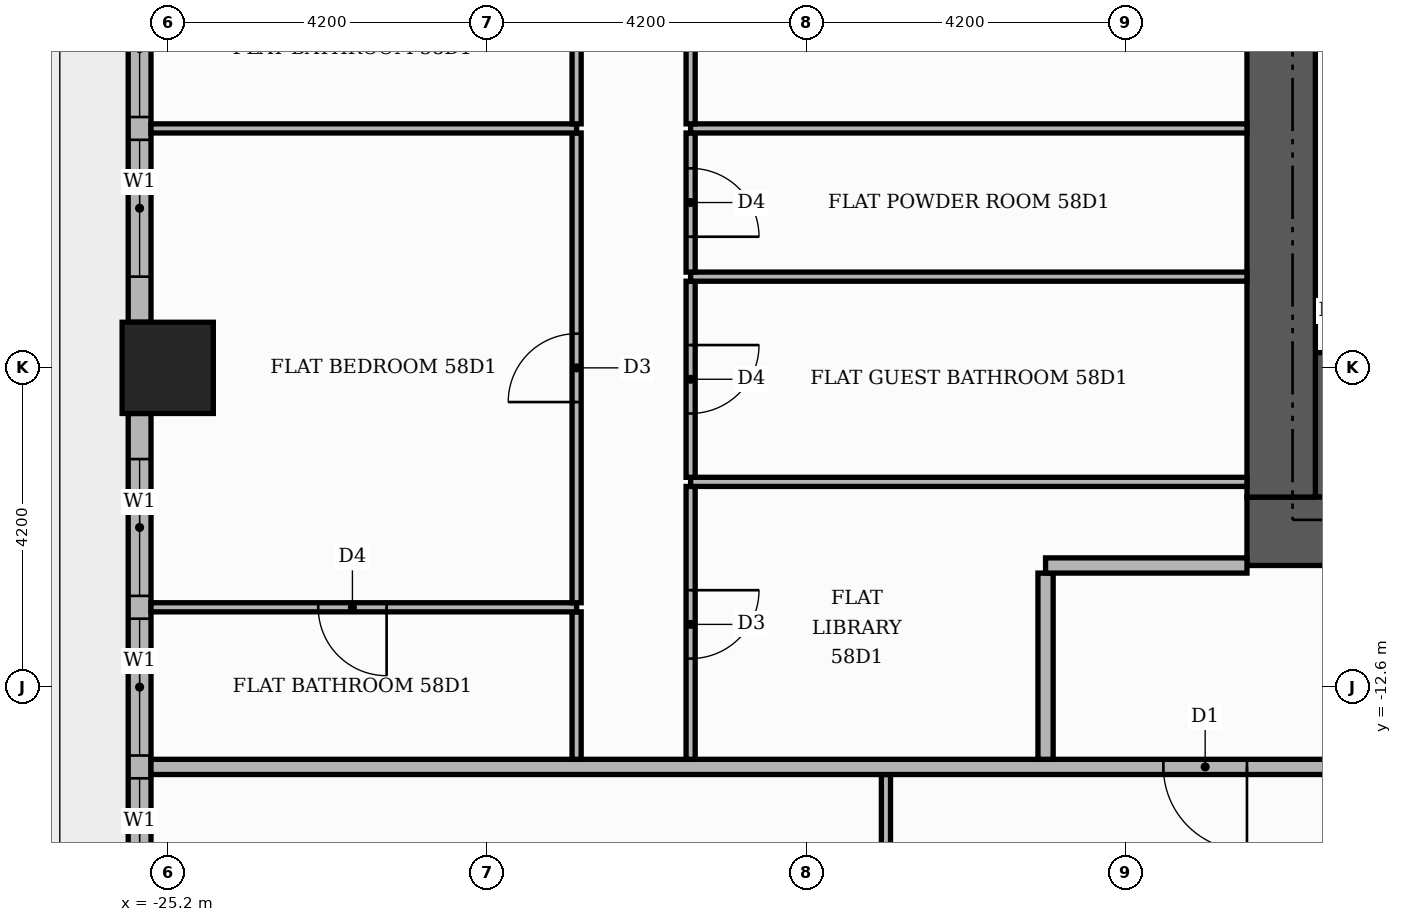
"""IFC4 building model, lengths in metres.
Left out: names, types, materials, properties, quantities, classifications, styles, units other than length and angle.
Written with IfcOpenShell. Run it as: python <this file> out.ifc"""

import sys

from ifc_helpers import new_model, si_unit, direction, frame, frame_2d, origin, origin_2d, place, context, subcontext, project, spatial, rectangle, extrude, element, fill, save


model = new_model("IFC4")
c1 = context("Model", 3, precision=1e-05, world=origin(), true_north=direction((0.0, 1.0)))
c2 = subcontext(c1, "Body", "Model", "MODEL_VIEW")
j1 = project(units=[si_unit("LENGTHUNIT", "METRE"), si_unit("PLANEANGLEUNIT", "RADIAN")], contexts=[c1])
p1 = place(None, origin())
s1 = spatial("IfcSite", under=j1, at=p1, CompositionType="ELEMENT")
p2 = place(p1, origin())
s2 = spatial("IfcBuilding", under=s1, at=p2, CompositionType="ELEMENT")
p3 = place(p2, frame((0.0, 0.0, 244.5)))
s3 = spatial("IfcBuildingStorey", under=s2, at=p3, CompositionType="ELEMENT", Elevation=244.5)
p4 = place(p3, frame((-10.1, -9.15, 0.0), z_axis=(0.0, 0.0, 1.0), x_axis=(1.0, 0.0, 0.0)))
e1 = element("IfcWall", 1, at=p4, inside=s3, PredefinedType="SHEAR", context=c2, shape_type="SweptSolid", body=[
    extrude(rectangle(XDim=4.6, YDim=1.9, at=frame_2d((2.3, 0.0))), origin(), (0.0, 0.0, 1.0), 3.48),
])
p5 = place(p3, frame((-11.0, -10.55, 0.0), z_axis=(0.0, 0.0, 1.0), x_axis=(1.0, 0.0, 0.0)))
e2 = element("IfcWall", 2, at=p5, inside=s3, PredefinedType="SHEAR", context=c2, shape_type="SweptSolid", body=[
    extrude(rectangle(XDim=22.0, YDim=0.9, at=frame_2d((11.0, 0.0))), origin(), (0.0, 0.0, 1.0), 3.48),
])
p6 = place(p5, frame((7.4, 0.0, 0.0)))
e3 = element("IfcOpeningElement", 3, at=p6, cuts=e2, PredefinedType="OPENING", context=c2, shape_type="SweptSolid", body=[
    extrude(rectangle(XDim=1.8, YDim=2.2, at=frame_2d((0.9, 1.1))), frame((0.0, 0.46, 0.0), z_axis=(0.0, -1.0, 0.0), x_axis=(1.0, 0.0, 0.0)), (0.0, 0.0, 1.0), 0.92),
])
p7 = place(p3, frame((-10.55, -10.1, 0.0), z_axis=(0.0, 0.0, 1.0), x_axis=(0.0, 1.0, 0.0)))
e4 = element("IfcWall", 4, at=p7, inside=s3, PredefinedType="SHEAR", context=c2, shape_type="SweptSolid", body=[
    extrude(rectangle(XDim=20.2, YDim=0.9, at=frame_2d((10.1, 0.0))), origin(), (0.0, 0.0, 1.0), 3.48),
])
p8 = place(p3, frame((-25.2, -8.4, 0.0), z_axis=(0.0, 0.0, 1.0), x_axis=(1.0, 0.0, 0.0)))
e5 = element("IfcColumn", 5, at=p8, inside=s3, PredefinedType="COLUMN", context=c2, shape_type="SweptSolid", body=[
    extrude(rectangle(XDim=1.2, YDim=1.2, at=origin_2d()), origin(), (0.0, 0.0, 1.0), 3.9),
])
p9 = place(p3, frame((-25.57, -0.6, 0.0), z_axis=(0.0, 0.0, 1.0), x_axis=(0.0, -1.0, 0.0)))
e6 = element("IfcWall", 6, at=p9, inside=s3, PredefinedType="STANDARD", context=c2, shape_type="SweptSolid", body=[
    extrude(rectangle(XDim=7.2, YDim=0.3, at=frame_2d((3.6, 0.0))), origin(), (0.0, 0.0, 1.0), 3.48),
])
p10 = place(p9, frame((0.6, 0.0, 0.9)))
e7 = element("IfcOpeningElement", 7, at=p10, cuts=e6, PredefinedType="OPENING", context=c2, shape_type="SweptSolid", body=[
    extrude(rectangle(XDim=1.8, YDim=2.1, at=frame_2d((0.9, 1.05))), frame((0.0, 0.16, 0.0), z_axis=(0.0, -1.0, 0.0), x_axis=(1.0, 0.0, 0.0)), (0.0, 0.0, 1.0), 0.32),
])
p11 = place(p9, frame((2.7, 0.0, 0.9)))
e8 = element("IfcOpeningElement", 8, at=p11, cuts=e6, PredefinedType="OPENING", context=c2, shape_type="SweptSolid", body=[
    extrude(rectangle(XDim=1.8, YDim=2.1, at=frame_2d((0.9, 1.05))), frame((0.0, 0.16, 0.0), z_axis=(0.0, -1.0, 0.0), x_axis=(1.0, 0.0, 0.0)), (0.0, 0.0, 1.0), 0.32),
])
p12 = place(p9, frame((4.8, 0.0, 0.9)))
e9 = element("IfcOpeningElement", 9, at=p12, cuts=e6, PredefinedType="OPENING", context=c2, shape_type="SweptSolid", body=[
    extrude(rectangle(XDim=1.8, YDim=2.1, at=frame_2d((0.9, 1.05))), frame((0.0, 0.16, 0.0), z_axis=(0.0, -1.0, 0.0), x_axis=(1.0, 0.0, 0.0)), (0.0, 0.0, 1.0), 0.32),
])
p13 = place(p3, frame((-25.57, -9.0, 0.0), z_axis=(0.0, 0.0, 1.0), x_axis=(0.0, -1.0, 0.0)))
e10 = element("IfcWall", 10, at=p13, inside=s3, PredefinedType="STANDARD", context=c2, shape_type="SweptSolid", body=[
    extrude(rectangle(XDim=7.2, YDim=0.3, at=frame_2d((3.6, 0.0))), origin(), (0.0, 0.0, 1.0), 3.48),
])
p14 = place(p13, frame((0.6, 0.0, 0.9)))
e11 = element("IfcOpeningElement", 11, at=p14, cuts=e10, PredefinedType="OPENING", context=c2, shape_type="SweptSolid", body=[
    extrude(rectangle(XDim=1.8, YDim=2.1, at=frame_2d((0.9, 1.05))), frame((0.0, 0.16, 0.0), z_axis=(0.0, -1.0, 0.0), x_axis=(1.0, 0.0, 0.0)), (0.0, 0.0, 1.0), 0.32),
])
p15 = place(p13, frame((2.7, 0.0, 0.9)))
e12 = element("IfcOpeningElement", 12, at=p15, cuts=e10, PredefinedType="OPENING", context=c2, shape_type="SweptSolid", body=[
    extrude(rectangle(XDim=1.8, YDim=2.1, at=frame_2d((0.9, 1.05))), frame((0.0, 0.16, 0.0), z_axis=(0.0, -1.0, 0.0), x_axis=(1.0, 0.0, 0.0)), (0.0, 0.0, 1.0), 0.32),
])
p16 = place(p13, frame((4.8, 0.0, 0.9)))
e13 = element("IfcOpeningElement", 13, at=p16, cuts=e10, PredefinedType="OPENING", context=c2, shape_type="SweptSolid", body=[
    extrude(rectangle(XDim=1.8, YDim=2.1, at=frame_2d((0.9, 1.05))), frame((0.0, 0.16, 0.0), z_axis=(0.0, -1.0, 0.0), x_axis=(1.0, 0.0, 0.0)), (0.0, 0.0, 1.0), 0.32),
])
p17 = place(p3, frame((-15.75, -20.06, 0.0), z_axis=(0.0, 0.0, 1.0), x_axis=(0.0, 1.0, 0.0)))
e14 = element("IfcWall", 14, at=p17, inside=s3, PredefinedType="PARTITIONING", context=c2, shape_type="SweptSolid", body=[
    extrude(rectangle(XDim=6.31, YDim=0.12, at=frame_2d((3.155, 0.0))), origin(), (0.0, 0.0, 1.0), 3.48),
])
p18 = place(p17, frame((2.725, 0.0, 0.0)))
e15 = element("IfcOpeningElement", 15, at=p18, cuts=e14, PredefinedType="OPENING", context=c2, shape_type="SweptSolid", body=[
    extrude(rectangle(XDim=0.9, YDim=2.1, at=frame_2d((0.45, 1.05))), frame((0.0, 0.07, 0.0), z_axis=(0.0, -1.0, 0.0), x_axis=(1.0, 0.0, 0.0)), (0.0, 0.0, 1.0), 0.14),
])
p19 = place(p3, frame((-25.42, -13.65, 0.0), z_axis=(0.0, 0.0, 1.0), x_axis=(1.0, 0.0, 0.0)))
e16 = element("IfcWall", 16, at=p19, inside=s3, PredefinedType="PARTITIONING", context=c2, shape_type="SweptSolid", body=[
    extrude(rectangle(XDim=39.07, YDim=0.2, at=frame_2d((19.535, 0.0))), origin(), (0.0, 0.0, 1.0), 3.48),
])
p20 = place(p19, frame((13.32, 0.0, 0.0)))
e17 = element("IfcOpeningElement", 17, at=p20, cuts=e16, PredefinedType="OPENING", context=c2, shape_type="SweptSolid", body=[
    extrude(rectangle(XDim=1.1, YDim=2.4, at=frame_2d((0.55, 1.2))), frame((0.0, 0.11, 0.0), z_axis=(0.0, -1.0, 0.0), x_axis=(1.0, 0.0, 0.0)), (0.0, 0.0, 1.0), 0.22),
])
p21 = place(p3, frame((-19.82, -13.55, 0.0), z_axis=(0.0, 0.0, 1.0), x_axis=(0.0, 1.0, 0.0)))
e18 = element("IfcWall", 18, at=p21, inside=s3, PredefinedType="PARTITIONING", context=c2, shape_type="SweptSolid", body=[
    extrude(rectangle(XDim=1.94, YDim=0.12, at=frame_2d((0.97, 0.0))), origin(), (0.0, 0.0, 1.0), 3.48),
])
p22 = place(p3, frame((-18.32, -13.55, 0.0), z_axis=(0.0, 0.0, 1.0), x_axis=(0.0, 1.0, 0.0)))
e19 = element("IfcWall", 19, at=p22, inside=s3, PredefinedType="PARTITIONING", context=c2, shape_type="SweptSolid", body=[
    extrude(rectangle(XDim=3.59, YDim=0.12, at=frame_2d((1.795, 0.0))), origin(), (0.0, 0.0, 1.0), 3.48),
])
p23 = place(p22, frame((1.325, 0.0, 0.0)))
e20 = element("IfcOpeningElement", 20, at=p23, cuts=e19, PredefinedType="OPENING", context=c2, shape_type="SweptSolid", body=[
    extrude(rectangle(XDim=0.9, YDim=2.1, at=frame_2d((0.45, 1.05))), frame((0.0, 0.07, 0.0), z_axis=(0.0, -1.0, 0.0), x_axis=(1.0, 0.0, 0.0)), (0.0, 0.0, 1.0), 0.14),
])
p24 = place(p3, frame((-13.65, -13.55, 0.0), z_axis=(0.0, 0.0, 1.0), x_axis=(0.0, 1.0, 0.0)))
e21 = element("IfcWall", 21, at=p24, inside=s3, PredefinedType="PARTITIONING", context=c2, shape_type="SweptSolid", body=[
    extrude(rectangle(XDim=2.45, YDim=0.2, at=frame_2d((1.225, 0.0))), origin(), (0.0, 0.0, 1.0), 3.48),
])
p25 = place(p3, frame((-25.42, -11.55, 0.0), z_axis=(0.0, 0.0, 1.0), x_axis=(1.0, 0.0, 0.0)))
e22 = element("IfcWall", 22, at=p25, inside=s3, PredefinedType="PARTITIONING", context=c2, shape_type="SweptSolid", body=[
    extrude(rectangle(XDim=5.6, YDim=0.12, at=frame_2d((2.8, 0.0))), origin(), (0.0, 0.0, 1.0), 3.48),
])
p26 = place(p25, frame((2.2, 0.0, 0.0)))
e23 = element("IfcOpeningElement", 23, at=p26, cuts=e22, PredefinedType="OPENING", context=c2, shape_type="SweptSolid", body=[
    extrude(rectangle(XDim=0.9, YDim=2.1, at=frame_2d((0.45, 1.05))), frame((0.0, 0.07, 0.0), z_axis=(0.0, -1.0, 0.0), x_axis=(1.0, 0.0, 0.0)), (0.0, 0.0, 1.0), 0.14),
])
p27 = place(p3, frame((-19.82, -11.49, 0.0), z_axis=(0.0, 0.0, 1.0), x_axis=(0.0, 1.0, 0.0)))
e24 = element("IfcWall", 24, at=p27, inside=s3, PredefinedType="PARTITIONING", context=c2, shape_type="SweptSolid", body=[
    extrude(rectangle(XDim=6.18, YDim=0.12, at=frame_2d((3.09, 0.0))), origin(), (0.0, 0.0, 1.0), 3.48),
])
p28 = place(p27, frame((2.64, 0.0, 0.0)))
e25 = element("IfcOpeningElement", 25, at=p28, cuts=e24, PredefinedType="OPENING", context=c2, shape_type="SweptSolid", body=[
    extrude(rectangle(XDim=0.9, YDim=2.1, at=frame_2d((0.45, 1.05))), frame((0.0, 0.07, 0.0), z_axis=(0.0, -1.0, 0.0), x_axis=(1.0, 0.0, 0.0)), (0.0, 0.0, 1.0), 0.14),
])
p29 = place(p3, frame((-13.65, -11.0, 0.0), z_axis=(0.0, 0.0, 1.0), x_axis=(1.0, 0.0, 0.0)))
e26 = element("IfcWall", 26, at=p29, inside=s3, PredefinedType="PARTITIONING", context=c2, shape_type="SweptSolid", body=[
    extrude(rectangle(XDim=2.65, YDim=0.2, at=frame_2d((1.325, 0.0))), origin(), (0.0, 0.0, 1.0), 3.48),
])
p30 = place(p3, frame((-18.32, -9.9, 0.0), z_axis=(0.0, 0.0, 1.0), x_axis=(1.0, 0.0, 0.0)))
e27 = element("IfcWall", 27, at=p30, inside=s3, PredefinedType="PARTITIONING", context=c2, shape_type="SweptSolid", body=[
    extrude(rectangle(XDim=7.32, YDim=0.12, at=frame_2d((3.66, 0.0))), origin(), (0.0, 0.0, 1.0), 3.48),
])
p31 = place(p3, frame((-18.32, -9.84, 0.0), z_axis=(0.0, 0.0, 1.0), x_axis=(0.0, 1.0, 0.0)))
e28 = element("IfcWall", 28, at=p31, inside=s3, PredefinedType="PARTITIONING", context=c2, shape_type="SweptSolid", body=[
    extrude(rectangle(XDim=2.58, YDim=0.12, at=frame_2d((1.29, 0.0))), origin(), (0.0, 0.0, 1.0), 3.48),
])
p32 = place(p31, frame((0.84, 0.0, 0.0)))
e29 = element("IfcOpeningElement", 29, at=p32, cuts=e28, PredefinedType="OPENING", context=c2, shape_type="SweptSolid", body=[
    extrude(rectangle(XDim=0.9, YDim=2.1, at=frame_2d((0.45, 1.05))), frame((0.0, 0.07, 0.0), z_axis=(0.0, -1.0, 0.0), x_axis=(1.0, 0.0, 0.0)), (0.0, 0.0, 1.0), 0.14),
])
p33 = place(p3, frame((-18.32, -7.2, 0.0), z_axis=(0.0, 0.0, 1.0), x_axis=(1.0, 0.0, 0.0)))
e30 = element("IfcWall", 30, at=p33, inside=s3, PredefinedType="PARTITIONING", context=c2, shape_type="SweptSolid", body=[
    extrude(rectangle(XDim=7.32, YDim=0.12, at=frame_2d((3.66, 0.0))), origin(), (0.0, 0.0, 1.0), 3.48),
])
p34 = place(p3, frame((-18.32, -7.14, 0.0), z_axis=(0.0, 0.0, 1.0), x_axis=(0.0, 1.0, 0.0)))
e31 = element("IfcWall", 31, at=p34, inside=s3, PredefinedType="PARTITIONING", context=c2, shape_type="SweptSolid", body=[
    extrude(rectangle(XDim=1.83, YDim=0.12, at=frame_2d((0.915, 0.0))), origin(), (0.0, 0.0, 1.0), 3.48),
])
p35 = place(p34, frame((0.465, 0.0, 0.0)))
e32 = element("IfcOpeningElement", 32, at=p35, cuts=e31, PredefinedType="OPENING", context=c2, shape_type="SweptSolid", body=[
    extrude(rectangle(XDim=0.9, YDim=2.1, at=frame_2d((0.45, 1.05))), frame((0.0, 0.07, 0.0), z_axis=(0.0, -1.0, 0.0), x_axis=(1.0, 0.0, 0.0)), (0.0, 0.0, 1.0), 0.14),
])
p36 = place(p3, frame((-25.42, -5.25, 0.0), z_axis=(0.0, 0.0, 1.0), x_axis=(1.0, 0.0, 0.0)))
e33 = element("IfcWall", 33, at=p36, inside=s3, PredefinedType="PARTITIONING", context=c2, shape_type="SweptSolid", body=[
    extrude(rectangle(XDim=5.6, YDim=0.12, at=frame_2d((2.8, 0.0))), origin(), (0.0, 0.0, 1.0), 3.48),
])
p37 = place(p3, frame((-18.32, -5.25, 0.0), z_axis=(0.0, 0.0, 1.0), x_axis=(1.0, 0.0, 0.0)))
e34 = element("IfcWall", 34, at=p37, inside=s3, PredefinedType="PARTITIONING", context=c2, shape_type="SweptSolid", body=[
    extrude(rectangle(XDim=7.32, YDim=0.12, at=frame_2d((3.66, 0.0))), origin(), (0.0, 0.0, 1.0), 3.48),
])
p38 = place(p3, frame((-19.82, -5.19, 0.0), z_axis=(0.0, 0.0, 1.0), x_axis=(0.0, 1.0, 0.0)))
e35 = element("IfcWall", 35, at=p38, inside=s3, PredefinedType="PARTITIONING", context=c2, shape_type="SweptSolid", body=[
    extrude(rectangle(XDim=1.98, YDim=0.12, at=frame_2d((0.99, 0.0))), origin(), (0.0, 0.0, 1.0), 3.48),
])
p39 = place(p3, frame((-18.32, -5.19, 0.0), z_axis=(0.0, 0.0, 1.0), x_axis=(0.0, 1.0, 0.0)))
e36 = element("IfcWall", 36, at=p39, inside=s3, PredefinedType="PARTITIONING", context=c2, shape_type="SweptSolid", body=[
    extrude(rectangle(XDim=4.08, YDim=0.12, at=frame_2d((2.04, 0.0))), origin(), (0.0, 0.0, 1.0), 3.48),
])
p40 = place(p39, frame((1.59, 0.0, 0.0)))
e37 = element("IfcOpeningElement", 37, at=p40, cuts=e36, PredefinedType="OPENING", context=c2, shape_type="SweptSolid", body=[
    extrude(rectangle(XDim=0.9, YDim=2.1, at=frame_2d((0.45, 1.05))), frame((0.0, 0.07, 0.0), z_axis=(0.0, -1.0, 0.0), x_axis=(1.0, 0.0, 0.0)), (0.0, 0.0, 1.0), 0.14),
])
p41 = place(p11, origin())
e38 = element("IfcWindow", 38, at=p41, inside=s3, PartitioningType="SINGLE_PANEL", PredefinedType="WINDOW", context=c2, shape_type="SweptSolid", body=[
    extrude(rectangle(XDim=1.8, YDim=2.1, at=frame_2d((0.9, 1.05))), frame((0.0, 0.03, 0.0), z_axis=(0.0, -1.0, 0.0), x_axis=(1.0, 0.0, 0.0)), (0.0, 0.0, 1.0), 0.06),
])
fill(e8, e38)
p42 = place(p12, origin())
e39 = element("IfcWindow", 39, at=p42, inside=s3, PartitioningType="SINGLE_PANEL", PredefinedType="WINDOW", context=c2, shape_type="SweptSolid", body=[
    extrude(rectangle(XDim=1.8, YDim=2.1, at=frame_2d((0.9, 1.05))), frame((0.0, 0.03, 0.0), z_axis=(0.0, -1.0, 0.0), x_axis=(1.0, 0.0, 0.0)), (0.0, 0.0, 1.0), 0.06),
])
fill(e9, e39)
p43 = place(p14, origin())
e40 = element("IfcWindow", 40, at=p43, inside=s3, PartitioningType="SINGLE_PANEL", PredefinedType="WINDOW", context=c2, shape_type="SweptSolid", body=[
    extrude(rectangle(XDim=1.8, YDim=2.1, at=frame_2d((0.9, 1.05))), frame((0.0, 0.03, 0.0), z_axis=(0.0, -1.0, 0.0), x_axis=(1.0, 0.0, 0.0)), (0.0, 0.0, 1.0), 0.06),
])
fill(e11, e40)
p44 = place(p15, origin())
e41 = element("IfcWindow", 41, at=p44, inside=s3, PartitioningType="SINGLE_PANEL", PredefinedType="WINDOW", context=c2, shape_type="SweptSolid", body=[
    extrude(rectangle(XDim=1.8, YDim=2.1, at=frame_2d((0.9, 1.05))), frame((0.0, 0.03, 0.0), z_axis=(0.0, -1.0, 0.0), x_axis=(1.0, 0.0, 0.0)), (0.0, 0.0, 1.0), 0.06),
])
fill(e12, e41)
p45 = place(p16, origin())
e42 = element("IfcWindow", 42, at=p45, inside=s3, PartitioningType="SINGLE_PANEL", PredefinedType="WINDOW", context=c2, shape_type="SweptSolid", body=[
    extrude(rectangle(XDim=1.8, YDim=2.1, at=frame_2d((0.9, 1.05))), frame((0.0, 0.03, 0.0), z_axis=(0.0, -1.0, 0.0), x_axis=(1.0, 0.0, 0.0)), (0.0, 0.0, 1.0), 0.06),
])
fill(e13, e42)
p46 = place(p20, frame((1.1, 0.0, 0.0), z_axis=(0.0, 0.0, 1.0), x_axis=(-1.0, 0.0, 0.0)))
e43 = element("IfcDoor", 43, at=p46, inside=s3, OperationType="SINGLE_SWING_RIGHT", PredefinedType="DOOR", context=c2, shape_type="SweptSolid", body=[
    extrude(rectangle(XDim=1.1, YDim=2.4, at=frame_2d((0.55, 1.2))), frame((0.0, 0.025, 0.0), z_axis=(0.0, -1.0, 0.0), x_axis=(1.0, 0.0, 0.0)), (0.0, 0.0, 1.0), 0.05),
])
fill(e17, e43)
p47 = place(p35, frame((0.9, 0.0, 0.0), z_axis=(0.0, 0.0, 1.0), x_axis=(-1.0, 0.0, 0.0)))
e44 = element("IfcDoor", 44, at=p47, inside=s3, OperationType="SINGLE_SWING_LEFT", PredefinedType="DOOR", context=c2, shape_type="SweptSolid", body=[
    extrude(rectangle(XDim=0.9, YDim=2.1, at=frame_2d((0.45, 1.05))), frame((0.0, 0.025, 0.0), z_axis=(0.0, -1.0, 0.0), x_axis=(1.0, 0.0, 0.0)), (0.0, 0.0, 1.0), 0.05),
])
fill(e32, e44)
p48 = place(p32, frame((0.9, 0.0, 0.0), z_axis=(0.0, 0.0, 1.0), x_axis=(-1.0, 0.0, 0.0)))
e45 = element("IfcDoor", 45, at=p48, inside=s3, OperationType="SINGLE_SWING_RIGHT", PredefinedType="DOOR", context=c2, shape_type="SweptSolid", body=[
    extrude(rectangle(XDim=0.9, YDim=2.1, at=frame_2d((0.45, 1.05))), frame((0.0, 0.025, 0.0), z_axis=(0.0, -1.0, 0.0), x_axis=(1.0, 0.0, 0.0)), (0.0, 0.0, 1.0), 0.05),
])
fill(e29, e45)
p49 = place(p23, frame((0.9, 0.0, 0.0), z_axis=(0.0, 0.0, 1.0), x_axis=(-1.0, 0.0, 0.0)))
e46 = element("IfcDoor", 46, at=p49, inside=s3, OperationType="SINGLE_SWING_RIGHT", PredefinedType="DOOR", context=c2, shape_type="SweptSolid", body=[
    extrude(rectangle(XDim=0.9, YDim=2.1, at=frame_2d((0.45, 1.05))), frame((0.0, 0.025, 0.0), z_axis=(0.0, -1.0, 0.0), x_axis=(1.0, 0.0, 0.0)), (0.0, 0.0, 1.0), 0.05),
])
fill(e20, e46)
p50 = place(p28, origin())
e47 = element("IfcDoor", 47, at=p50, inside=s3, OperationType="SINGLE_SWING_LEFT", PredefinedType="DOOR", context=c2, shape_type="SweptSolid", body=[
    extrude(rectangle(XDim=0.9, YDim=2.1, at=frame_2d((0.45, 1.05))), frame((0.0, 0.025, 0.0), z_axis=(0.0, -1.0, 0.0), x_axis=(1.0, 0.0, 0.0)), (0.0, 0.0, 1.0), 0.05),
])
fill(e25, e47)
p51 = place(p26, frame((0.9, 0.0, 0.0), z_axis=(0.0, 0.0, 1.0), x_axis=(-1.0, 0.0, 0.0)))
e48 = element("IfcDoor", 48, at=p51, inside=s3, OperationType="SINGLE_SWING_RIGHT", PredefinedType="DOOR", context=c2, shape_type="SweptSolid", body=[
    extrude(rectangle(XDim=0.9, YDim=2.1, at=frame_2d((0.45, 1.05))), frame((0.0, 0.025, 0.0), z_axis=(0.0, -1.0, 0.0), x_axis=(1.0, 0.0, 0.0)), (0.0, 0.0, 1.0), 0.05),
])
fill(e23, e48)
save(model, sys.argv[1])
